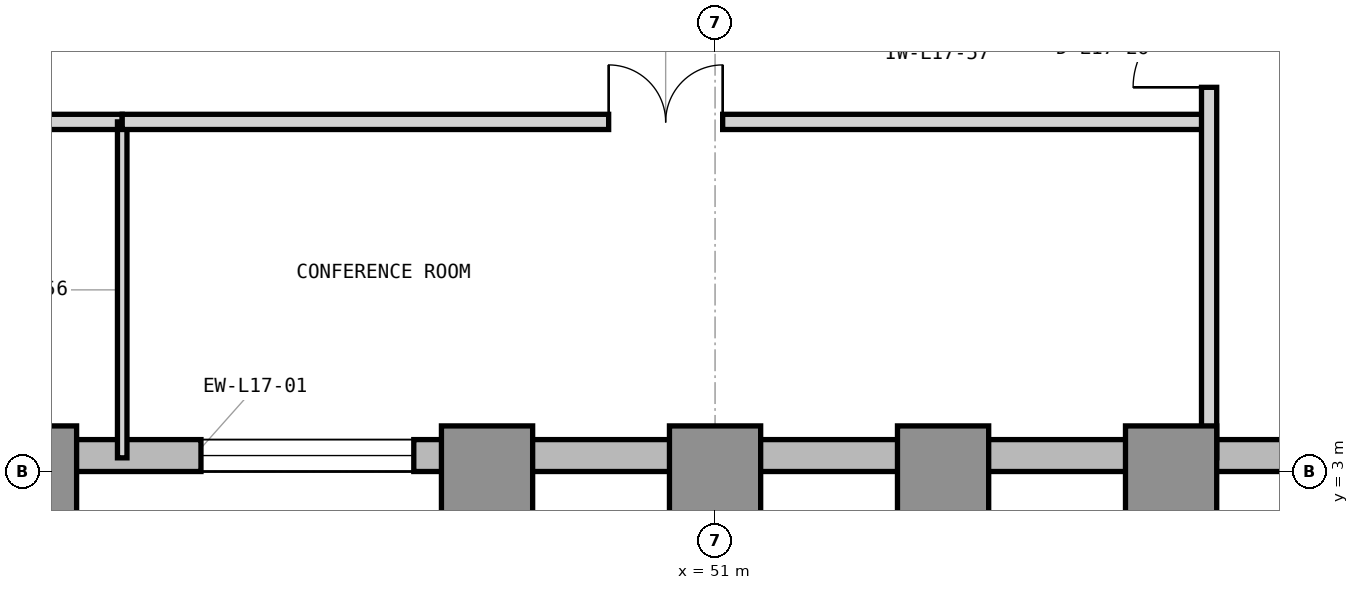
"""IFC4 building model, lengths in metres.
Left out: names, types, materials, properties, quantities, classifications, styles, units other than length and angle.
Written with IfcOpenShell. Run it as: python <this file> out.ifc"""

import sys

from ifc_helpers import new_model, si_unit, direction, frame, frame_2d, origin, origin_2d, place, context, subcontext, project, spatial, rectangle, extrude, element, fill, save


model = new_model("IFC4")
c1 = context("Model", 3, precision=1e-05, world=origin(), true_north=direction((0.0, 1.0)))
c2 = subcontext(c1, "Body", "Model", "MODEL_VIEW")
j1 = project(units=[si_unit("LENGTHUNIT", "METRE"), si_unit("PLANEANGLEUNIT", "RADIAN")], contexts=[c1])
p1 = place(None, origin())
s1 = spatial("IfcSite", under=j1, at=p1, CompositionType="ELEMENT")
p2 = place(p1, origin())
s2 = spatial("IfcBuilding", under=s1, at=p2, CompositionType="ELEMENT")
p3 = place(p2, frame((0.0, 0.0, 76.2)))
s3 = spatial("IfcBuildingStorey", under=s2, at=p3, CompositionType="ELEMENT", Elevation=76.2)
for number, where, z_axis, x_axis in (
    (1, (42.0, 3.0, 0.0), (0.0, 0.0, 1.0), (1.0, 0.0, 0.0)),
    (2, (48.0, 3.0, 0.0), (0.0, 0.0, 1.0), (1.0, 0.0, 0.0)),
    (3, (51.0, 3.0, 0.0), (0.0, 0.0, 1.0), (1.0, 0.0, 0.0)),
    (4, (54.0, 3.0, 0.0), (0.0, 0.0, 1.0), (1.0, 0.0, 0.0)),
    (5, (57.0, 3.0, 0.0), (0.0, 0.0, 1.0), (1.0, 0.0, 0.0)),
):
    element("IfcColumn", number, at=place(p3, frame(where, z_axis=z_axis, x_axis=x_axis)), inside=s3, PredefinedType="COLUMN", context=c2, shape_type="SweptSolid", body=[
        extrude(rectangle(XDim=1.2, YDim=1.2, at=origin_2d()), origin(), (0.0, 0.0, 1.0), 4.2),
    ])
p4 = place(p3, frame((23.9, 3.21, 0.0), z_axis=(0.0, 0.0, 1.0), x_axis=(1.0, 0.0, 0.0)))
e6 = element("IfcWall", 6, at=p4, inside=s3, PredefinedType="STANDARD", context=c2, shape_type="SweptSolid", body=[
    extrude(rectangle(XDim=40.5, YDim=0.42, at=frame_2d((20.25, 0.0))), origin(), (0.0, 0.0, 1.0), 3.98),
])
p5 = place(p4, frame((1.1, 0.0, 0.85)))
e7 = element("IfcOpeningElement", 7, at=p5, cuts=e6, PredefinedType="OPENING", context=c2, shape_type="SweptSolid", body=[
    extrude(rectangle(XDim=1.2, YDim=2.45, at=frame_2d((0.6, 1.225))), frame((0.0, 0.22, 0.0), z_axis=(0.0, -1.0, 0.0), x_axis=(1.0, 0.0, 0.0)), (0.0, 0.0, 1.0), 0.44),
])
p6 = place(p4, frame((5.336, 0.0, 0.85)))
e8 = element("IfcOpeningElement", 8, at=p6, cuts=e6, PredefinedType="OPENING", context=c2, shape_type="SweptSolid", body=[
    extrude(rectangle(XDim=2.8, YDim=2.45, at=frame_2d((1.4, 1.225))), frame((0.0, 0.22, 0.0), z_axis=(0.0, -1.0, 0.0), x_axis=(1.0, 0.0, 0.0)), (0.0, 0.0, 1.0), 0.44),
])
p7 = place(p4, frame((14.136, 0.0, 0.85)))
e9 = element("IfcOpeningElement", 9, at=p7, cuts=e6, PredefinedType="OPENING", context=c2, shape_type="SweptSolid", body=[
    extrude(rectangle(XDim=2.8, YDim=2.45, at=frame_2d((1.4, 1.225))), frame((0.0, 0.22, 0.0), z_axis=(0.0, -1.0, 0.0), x_axis=(1.0, 0.0, 0.0)), (0.0, 0.0, 1.0), 0.44),
])
p8 = place(p4, frame((20.336, 0.0, 0.85)))
e10 = element("IfcOpeningElement", 10, at=p8, cuts=e6, PredefinedType="OPENING", context=c2, shape_type="SweptSolid", body=[
    extrude(rectangle(XDim=2.8, YDim=2.45, at=frame_2d((1.4, 1.225))), frame((0.0, 0.22, 0.0), z_axis=(0.0, -1.0, 0.0), x_axis=(1.0, 0.0, 0.0)), (0.0, 0.0, 1.0), 0.44),
])
p9 = place(p3, frame((35.7, 7.6, 0.0), z_axis=(0.0, 0.0, 1.0), x_axis=(1.0, 0.0, 0.0)))
e11 = element("IfcWall", 11, at=p9, inside=s3, PredefinedType="PARTITIONING", context=c2, shape_type="SweptSolid", body=[
    extrude(rectangle(XDim=7.5, YDim=0.2, at=frame_2d((3.75, 0.0))), origin(), (0.0, 0.0, 1.0), 3.97),
])
p10 = place(p9, frame((3.25, 0.0, 0.0)))
e12 = element("IfcOpeningElement", 12, at=p10, cuts=e11, PredefinedType="OPENING", context=c2, shape_type="SweptSolid", body=[
    extrude(rectangle(XDim=1.0, YDim=2.15, at=frame_2d((0.5, 1.075))), frame((0.0, 0.11, 0.0), z_axis=(0.0, -1.0, 0.0), x_axis=(1.0, 0.0, 0.0)), (0.0, 0.0, 1.0), 0.22),
])
p11 = place(p3, frame((43.2, 3.18, 0.0), z_axis=(0.0, 0.0, 1.0), x_axis=(0.0, 1.0, 0.0)))
e13 = element("IfcWall", 13, at=p11, inside=s3, PredefinedType="PARTITIONING", context=c2, shape_type="SweptSolid", body=[
    extrude(rectangle(XDim=4.42, YDim=0.125, at=frame_2d((2.21, 0.0))), origin(), (0.0, 0.0, 1.0), 3.97),
])
p12 = place(p3, frame((43.2, 7.6, 0.0), z_axis=(0.0, 0.0, 1.0), x_axis=(1.0, 0.0, 0.0)))
e14 = element("IfcWall", 14, at=p12, inside=s3, PredefinedType="PARTITIONING", context=c2, shape_type="SweptSolid", body=[
    extrude(rectangle(XDim=14.3, YDim=0.2, at=frame_2d((7.15, 0.0))), origin(), (0.0, 0.0, 1.0), 3.97),
])
p13 = place(p12, frame((6.4, 0.0, 0.0)))
e15 = element("IfcOpeningElement", 15, at=p13, cuts=e14, PredefinedType="OPENING", context=c2, shape_type="SweptSolid", body=[
    extrude(rectangle(XDim=1.5, YDim=2.3, at=frame_2d((0.75, 1.15))), frame((0.0, 0.11, 0.0), z_axis=(0.0, -1.0, 0.0), x_axis=(1.0, 0.0, 0.0)), (0.0, 0.0, 1.0), 0.22),
])
p14 = place(p3, frame((57.5, 3.18, 0.0), z_axis=(0.0, 0.0, 1.0), x_axis=(0.0, 1.0, 0.0)))
e16 = element("IfcWall", 16, at=p14, inside=s3, PredefinedType="PARTITIONING", context=c2, shape_type="SweptSolid", body=[
    extrude(rectangle(XDim=17.64, YDim=0.2, at=frame_2d((8.82, 0.0))), origin(), (0.0, 0.0, 1.0), 3.97),
])
p15 = place(p14, frame((4.875, 0.0, 0.0)))
e17 = element("IfcOpeningElement", 17, at=p15, cuts=e16, PredefinedType="OPENING", context=c2, shape_type="SweptSolid", body=[
    extrude(rectangle(XDim=1.0, YDim=2.15, at=frame_2d((0.5, 1.075))), frame((0.0, 0.11, 0.0), z_axis=(0.0, -1.0, 0.0), x_axis=(1.0, 0.0, 0.0)), (0.0, 0.0, 1.0), 0.22),
])
p16 = place(p13, origin())
e18 = element("IfcDoor", 18, at=p16, inside=s3, OperationType="DOUBLE_DOOR_SINGLE_SWING", PredefinedType="DOOR", context=c2, shape_type="SweptSolid", body=[
    extrude(rectangle(XDim=1.5, YDim=2.3, at=frame_2d((0.75, 1.15))), frame((0.0, 0.025, 0.0), z_axis=(0.0, -1.0, 0.0), x_axis=(1.0, 0.0, 0.0)), (0.0, 0.0, 1.0), 0.05),
])
fill(e15, e18)
p17 = place(p15, origin())
e19 = element("IfcDoor", 19, at=p17, inside=s3, OperationType="SINGLE_SWING_LEFT", PredefinedType="DOOR", context=c2, shape_type="SweptSolid", body=[
    extrude(rectangle(XDim=1.0, YDim=2.15, at=frame_2d((0.5, 1.075))), frame((0.0, 0.025, 0.0), z_axis=(0.0, -1.0, 0.0), x_axis=(1.0, 0.0, 0.0)), (0.0, 0.0, 1.0), 0.05),
])
fill(e17, e19)
p18 = place(p8, origin())
e20 = element("IfcWindow", 20, at=p18, inside=s3, PartitioningType="SINGLE_PANEL", PredefinedType="WINDOW", context=c2, shape_type="SweptSolid", body=[
    extrude(rectangle(XDim=2.8, YDim=2.45, at=frame_2d((1.4, 1.225))), frame((0.0, 0.11, 0.0), z_axis=(0.0, -1.0, 0.0), x_axis=(1.0, 0.0, 0.0)), (0.0, 0.0, 1.0), 0.06),
])
fill(e10, e20)
save(model, sys.argv[1])
